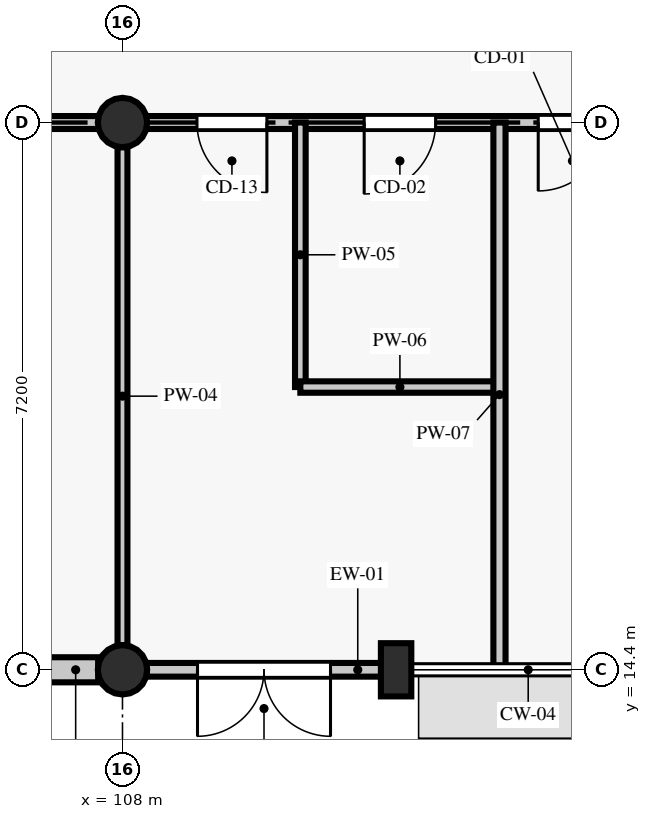
"""IFC4 building model, lengths in metres.
Left out: names, types, materials, properties, quantities, classifications, styles, units other than length and angle.
Written with IfcOpenShell. Run it as: python <this file> out.ifc"""

import sys

from ifc_helpers import new_model, si_unit, direction, frame, frame_2d, origin, origin_2d, place, context, subcontext, project, spatial, rectangle, circle, extrude, element, fill, save


model = new_model("IFC4")
c1 = context("Model", 3, precision=1e-05, world=origin(), true_north=direction((0.0, 1.0)))
c2 = subcontext(c1, "Body", "Model", "MODEL_VIEW")
j1 = project(units=[si_unit("LENGTHUNIT", "METRE"), si_unit("PLANEANGLEUNIT", "RADIAN")], contexts=[c1])
p1 = place(None, origin())
s1 = spatial("IfcSite", under=j1, at=p1, CompositionType="ELEMENT")
p2 = place(p1, origin())
s2 = spatial("IfcBuilding", under=s1, at=p2, CompositionType="ELEMENT")
p3 = place(p2, origin())
s3 = spatial("IfcBuildingStorey", under=s2, at=p3, CompositionType="ELEMENT", Elevation=0.0)
for number, where, z_axis, x_axis in (
    (1, (108.0, 14.4, 0.0), (0.0, 0.0, 1.0), (1.0, 0.0, 0.0)),
    (2, (108.0, 21.6, 0.0), (0.0, 0.0, 1.0), (1.0, 0.0, 0.0)),
):
    element("IfcColumn", number, at=place(p3, frame(where, z_axis=z_axis, x_axis=x_axis)), inside=s3, PredefinedType="COLUMN", context=c2, shape_type="SweptSolid", body=[
        extrude(circle(Radius=0.325, at=origin_2d()), origin(), (0.0, 0.0, 1.0), 4.495),
    ])
p4 = place(p3, frame((111.6, 14.4, 0.0), z_axis=(0.0, 0.0, 1.0), x_axis=(1.0, 0.0, 0.0)))
e3 = element("IfcColumn", 3, at=p4, inside=s3, PredefinedType="PILASTER", context=c2, shape_type="SweptSolid", body=[
    extrude(rectangle(XDim=0.4, YDim=0.7, at=origin_2d()), origin(), (0.0, 0.0, 1.0), 4.495),
])
p5 = place(p3, frame((104.596, 14.4, 0.0), z_axis=(0.0, 0.0, 1.0), x_axis=(1.0, 0.0, 0.0)))
e4 = element("IfcWall", 4, at=p5, inside=s3, PredefinedType="STANDARD", context=c2, shape_type="SweptSolid", body=[
    extrude(rectangle(XDim=3.084, YDim=0.33, at=frame_2d((1.542, 0.0))), origin(), (0.0, 0.0, 1.0), 2.9),
])
p6 = place(p5, frame((0.642, 0.0, 0.0)))
e5 = element("IfcOpeningElement", 5, at=p6, cuts=e4, PredefinedType="OPENING", context=c2, shape_type="SweptSolid", body=[
    extrude(rectangle(XDim=1.8, YDim=2.25, at=frame_2d((0.9, 1.125))), frame((0.0, 0.175, 0.0), z_axis=(0.0, -1.0, 0.0), x_axis=(1.0, 0.0, 0.0)), (0.0, 0.0, 1.0), 0.35),
])
p7 = place(p3, frame((108.32, 14.4, 0.0), z_axis=(0.0, 0.0, 1.0), x_axis=(1.0, 0.0, 0.0)))
e6 = element("IfcWall", 6, at=p7, inside=s3, PredefinedType="STANDARD", context=c2, shape_type="SweptSolid", body=[
    extrude(rectangle(XDim=3.084, YDim=0.18, at=frame_2d((1.542, 0.0))), origin(), (0.0, 0.0, 1.0), 2.9),
])
p8 = place(p7, frame((0.667, 0.0, 0.0)))
e7 = element("IfcOpeningElement", 7, at=p8, cuts=e6, PredefinedType="OPENING", context=c2, shape_type="SweptSolid", body=[
    extrude(rectangle(XDim=1.75, YDim=2.22, at=frame_2d((0.875, 1.11))), frame((0.0, 0.1, 0.0), z_axis=(0.0, -1.0, 0.0), x_axis=(1.0, 0.0, 0.0)), (0.0, 0.0, 1.0), 0.2),
])
p9 = place(p3, frame((93.925, 21.6, 0.0), z_axis=(0.0, 0.0, 1.0), x_axis=(1.0, 0.0, 0.0)))
e8 = element("IfcWall", 8, at=p9, inside=s3, PredefinedType="PARTITIONING", context=c2, shape_type="SweptSolid", body=[
    extrude(rectangle(XDim=28.15, YDim=0.17, at=frame_2d((14.075, 0.0))), origin(), (0.0, 0.0, 1.0), 3.795),
])
p10 = place(p9, frame((2.768, 0.0, 0.0)))
e9 = element("IfcOpeningElement", 9, at=p10, cuts=e8, PredefinedType="OPENING", context=c2, shape_type="SweptSolid", body=[
    extrude(rectangle(XDim=0.98, YDim=2.08, at=frame_2d((0.49, 1.04))), frame((0.0, 0.095, 0.0), z_axis=(0.0, -1.0, 0.0), x_axis=(1.0, 0.0, 0.0)), (0.0, 0.0, 1.0), 0.19),
])
p11 = place(p9, frame((8.08, 0.0, 0.0)))
e10 = element("IfcOpeningElement", 10, at=p11, cuts=e8, PredefinedType="OPENING", context=c2, shape_type="SweptSolid", body=[
    extrude(rectangle(XDim=1.02, YDim=2.08, at=frame_2d((0.51, 1.04))), frame((0.0, 0.095, 0.0), z_axis=(0.0, -1.0, 0.0), x_axis=(1.0, 0.0, 0.0)), (0.0, 0.0, 1.0), 0.19),
])
p12 = place(p9, frame((9.95, 0.0, 0.0)))
e11 = element("IfcOpeningElement", 11, at=p12, cuts=e8, PredefinedType="OPENING", context=c2, shape_type="SweptSolid", body=[
    extrude(rectangle(XDim=1.54, YDim=2.2, at=frame_2d((0.77, 1.1))), frame((0.0, 0.095, 0.0), z_axis=(0.0, -1.0, 0.0), x_axis=(1.0, 0.0, 0.0)), (0.0, 0.0, 1.0), 0.19),
])
p13 = place(p9, frame((15.055, 0.0, 0.0)))
e12 = element("IfcOpeningElement", 12, at=p13, cuts=e8, PredefinedType="OPENING", context=c2, shape_type="SweptSolid", body=[
    extrude(rectangle(XDim=0.92, YDim=2.18, at=frame_2d((0.46, 1.09))), frame((0.0, 0.095, 0.0), z_axis=(0.0, -1.0, 0.0), x_axis=(1.0, 0.0, 0.0)), (0.0, 0.0, 1.0), 0.19),
])
p14 = place(p9, frame((17.255, 0.0, 0.0)))
e13 = element("IfcOpeningElement", 13, at=p14, cuts=e8, PredefinedType="OPENING", context=c2, shape_type="SweptSolid", body=[
    extrude(rectangle(XDim=0.94, YDim=2.08, at=frame_2d((0.47, 1.04))), frame((0.0, 0.095, 0.0), z_axis=(0.0, -1.0, 0.0), x_axis=(1.0, 0.0, 0.0)), (0.0, 0.0, 1.0), 0.19),
])
p15 = place(p9, frame((19.545, 0.0, 0.0)))
e14 = element("IfcOpeningElement", 14, at=p15, cuts=e8, PredefinedType="OPENING", context=c2, shape_type="SweptSolid", body=[
    extrude(rectangle(XDim=0.9, YDim=2.08, at=frame_2d((0.45, 1.04))), frame((0.0, 0.095, 0.0), z_axis=(0.0, -1.0, 0.0), x_axis=(1.0, 0.0, 0.0)), (0.0, 0.0, 1.0), 0.19),
])
p16 = place(p9, frame((23.11, 0.0, 0.0)))
e15 = element("IfcOpeningElement", 15, at=p16, cuts=e8, PredefinedType="OPENING", context=c2, shape_type="SweptSolid", body=[
    extrude(rectangle(XDim=0.95, YDim=2.13, at=frame_2d((0.475, 1.065))), frame((0.0, 0.095, 0.0), z_axis=(0.0, -1.0, 0.0), x_axis=(1.0, 0.0, 0.0)), (0.0, 0.0, 1.0), 0.19),
])
p17 = place(p9, frame((24.765, 0.0, 0.0)))
e16 = element("IfcOpeningElement", 16, at=p17, cuts=e8, PredefinedType="OPENING", context=c2, shape_type="SweptSolid", body=[
    extrude(rectangle(XDim=1.0, YDim=2.13, at=frame_2d((0.5, 1.065))), frame((0.0, 0.095, 0.0), z_axis=(0.0, -1.0, 0.0), x_axis=(1.0, 0.0, 0.0)), (0.0, 0.0, 1.0), 0.19),
])
p18 = place(p3, frame((108.0, 14.725, 0.0), z_axis=(0.0, 0.0, 1.0), x_axis=(0.0, 1.0, 0.0)))
e17 = element("IfcWall", 17, at=p18, inside=s3, PredefinedType="PARTITIONING", context=c2, shape_type="SweptSolid", body=[
    extrude(rectangle(XDim=6.55, YDim=0.13, at=frame_2d((3.275, 0.0))), origin(), (0.0, 0.0, 1.0), 3.945),
])
p19 = place(p3, frame((110.34, 18.12, 0.0), z_axis=(0.0, 0.0, 1.0), x_axis=(0.0, 1.0, 0.0)))
e18 = element("IfcWall", 18, at=p19, inside=s3, PredefinedType="PARTITIONING", context=c2, shape_type="SweptSolid", body=[
    extrude(rectangle(XDim=3.48, YDim=0.14, at=frame_2d((1.74, 0.0))), origin(), (0.0, 0.0, 1.0), 3.795),
])
p20 = place(p3, frame((110.34, 18.12, 0.0), z_axis=(0.0, 0.0, 1.0), x_axis=(1.0, 0.0, 0.0)))
e19 = element("IfcWall", 19, at=p20, inside=s3, PredefinedType="PARTITIONING", context=c2, shape_type="SweptSolid", body=[
    extrude(rectangle(XDim=2.62, YDim=0.15, at=frame_2d((1.31, 0.0))), origin(), (0.0, 0.0, 1.0), 4.195),
])
p21 = place(p3, frame((112.96, 14.44, 0.0), z_axis=(0.0, 0.0, 1.0), x_axis=(0.0, 1.0, 0.0)))
e20 = element("IfcWall", 20, at=p21, inside=s3, PredefinedType="PARTITIONING", context=c2, shape_type="SweptSolid", body=[
    extrude(rectangle(XDim=7.16, YDim=0.16, at=frame_2d((3.58, 0.0))), origin(), (0.0, 0.0, 1.0), 3.795),
])
p22 = place(p8, frame((1.75, 0.0, 0.0), z_axis=(0.0, 0.0, 1.0), x_axis=(-1.0, 0.0, 0.0)))
e21 = element("IfcDoor", 21, at=p22, inside=s3, OperationType="DOUBLE_DOOR_SINGLE_SWING", PredefinedType="DOOR", context=c2, shape_type="SweptSolid", body=[
    extrude(rectangle(XDim=1.75, YDim=2.22, at=frame_2d((0.875, 1.11))), frame((0.0, 0.025, 0.0), z_axis=(0.0, -1.0, 0.0), x_axis=(1.0, 0.0, 0.0)), (0.0, 0.0, 1.0), 0.05),
])
fill(e7, e21)
p23 = place(p13, frame((0.92, 0.0, 0.0), z_axis=(0.0, 0.0, 1.0), x_axis=(-1.0, 0.0, 0.0)))
e22 = element("IfcDoor", 22, at=p23, inside=s3, OperationType="SINGLE_SWING_LEFT", PredefinedType="DOOR", context=c2, shape_type="SweptSolid", body=[
    extrude(rectangle(XDim=0.92, YDim=2.18, at=frame_2d((0.46, 1.09))), frame((0.0, 0.025, 0.0), z_axis=(0.0, -1.0, 0.0), x_axis=(1.0, 0.0, 0.0)), (0.0, 0.0, 1.0), 0.05),
])
fill(e12, e22)
p24 = place(p14, frame((0.94, 0.0, 0.0), z_axis=(0.0, 0.0, 1.0), x_axis=(-1.0, 0.0, 0.0)))
e23 = element("IfcDoor", 23, at=p24, inside=s3, OperationType="SINGLE_SWING_RIGHT", PredefinedType="DOOR", context=c2, shape_type="SweptSolid", body=[
    extrude(rectangle(XDim=0.94, YDim=2.08, at=frame_2d((0.47, 1.04))), frame((0.0, 0.025, 0.0), z_axis=(0.0, -1.0, 0.0), x_axis=(1.0, 0.0, 0.0)), (0.0, 0.0, 1.0), 0.05),
])
fill(e13, e23)
p25 = place(p15, frame((0.9, 0.0, 0.0), z_axis=(0.0, 0.0, 1.0), x_axis=(-1.0, 0.0, 0.0)))
e24 = element("IfcDoor", 24, at=p25, inside=s3, OperationType="SINGLE_SWING_RIGHT", PredefinedType="DOOR", context=c2, shape_type="SweptSolid", body=[
    extrude(rectangle(XDim=0.9, YDim=2.08, at=frame_2d((0.45, 1.04))), frame((0.0, 0.025, 0.0), z_axis=(0.0, -1.0, 0.0), x_axis=(1.0, 0.0, 0.0)), (0.0, 0.0, 1.0), 0.05),
])
fill(e14, e24)
save(model, sys.argv[1])
